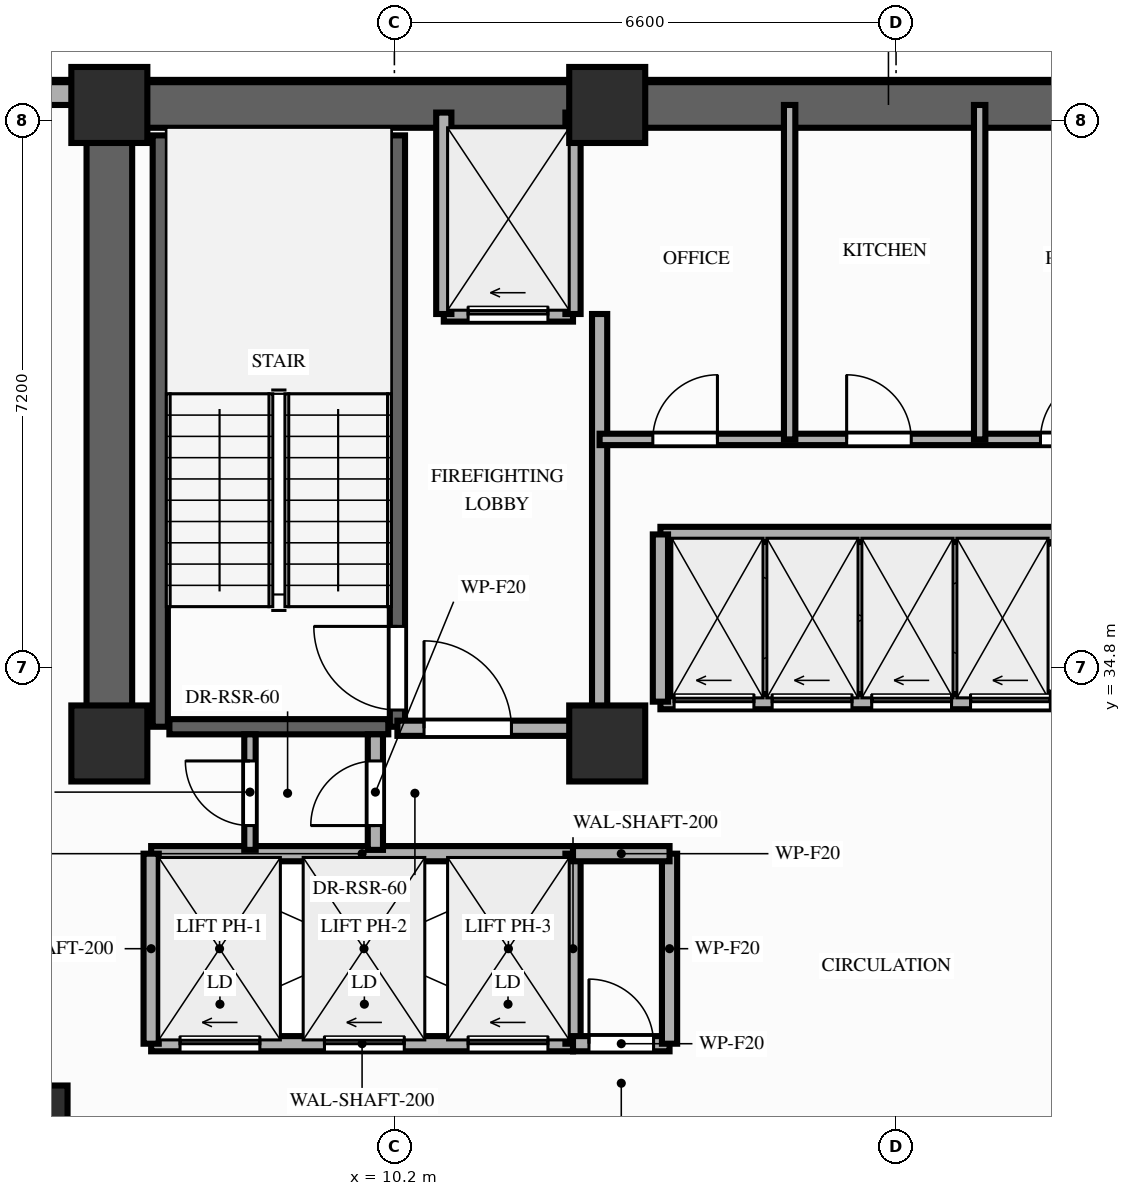
"""IFC4 building model, lengths in metres.
Left out: names, types, materials, properties, quantities, classifications, styles, units other than length and angle.
Written with IfcOpenShell. Run it as: python <this file> out.ifc"""

import sys

from ifc_helpers import new_model, si_unit, direction, frame, frame_2d, origin, origin_2d, place, context, subcontext, project, spatial, rectangle, extrude, element, fill, save


model = new_model("IFC4")
c1 = context("Model", 3, precision=1e-05, world=origin(), true_north=direction((0.0, 1.0)))
c2 = subcontext(c1, "Body", "Model", "MODEL_VIEW")
j1 = project(units=[si_unit("LENGTHUNIT", "METRE"), si_unit("PLANEANGLEUNIT", "RADIAN")], contexts=[c1])
p1 = place(None, origin())
s1 = spatial("IfcSite", under=j1, at=p1, CompositionType="ELEMENT")
p2 = place(p1, origin())
s2 = spatial("IfcBuilding", under=s1, at=p2, CompositionType="ELEMENT")
p3 = place(p2, frame((0.0, 0.0, 152.2)))
s3 = spatial("IfcBuildingStorey", under=s2, at=p3, CompositionType="ELEMENT", Elevation=152.2)
for number, where, z_axis, x_axis in (
    (1, (6.45, 33.8, 0.0), (0.0, 0.0, 1.0), (1.0, 0.0, 0.0)),
    (2, (13.0, 33.8, 0.0), (0.0, 0.0, 1.0), (1.0, 0.0, 0.0)),
    (3, (6.45, 42.2, 0.0), (0.0, 0.0, 1.0), (1.0, 0.0, 0.0)),
    (4, (13.0, 42.2, 0.0), (0.0, 0.0, 1.0), (1.0, 0.0, 0.0)),
    (5, (5.4, 28.8, 0.0), (0.0, 0.0, 1.0), (1.0, 0.0, 0.0)),
):
    element("IfcColumn", number, at=place(p3, frame(where, z_axis=z_axis, x_axis=x_axis)), inside=s3, PredefinedType="COLUMN", context=c2, shape_type="SweptSolid", body=[
        extrude(rectangle(XDim=1.0, YDim=1.0, at=origin_2d()), origin(), (0.0, 0.0, 1.0), 3.8),
    ])
p4 = place(p3, frame((6.0, 42.35, 0.0), z_axis=(0.0, 0.0, 1.0), x_axis=(-1.0, 0.0, 0.0)))
e6 = element("IfcWall", 6, at=p4, inside=s3, PredefinedType="STANDARD", context=c2, shape_type="SweptSolid", body=[
    extrude(rectangle(XDim=2.0, YDim=0.3, at=frame_2d((1.0, 0.0))), origin(), (0.0, 0.0, 1.0), 3.56),
])
p5 = place(p3, frame((6.45, 42.2, 0.0), z_axis=(0.0, 0.0, 1.0), x_axis=(1.0, 0.0, 0.0)))
e7 = element("IfcWall", 7, at=p5, inside=s3, PredefinedType="SHEAR", context=c2, shape_type="SweptSolid", body=[
    extrude(rectangle(XDim=20.45, YDim=0.6, at=frame_2d((10.225, 0.0))), origin(), (0.0, 0.0, 1.0), 3.56),
])
p6 = place(p3, frame((6.45, 33.8, 0.0), z_axis=(0.0, 0.0, 1.0), x_axis=(0.0, 1.0, 0.0)))
e8 = element("IfcWall", 8, at=p6, inside=s3, PredefinedType="SHEAR", context=c2, shape_type="SweptSolid", body=[
    extrude(rectangle(XDim=7.95, YDim=0.6, at=frame_2d((3.975, 0.0))), origin(), (0.0, 0.0, 1.0), 3.56),
])
p7 = place(p3, frame((7.12, 34.02, 0.0), z_axis=(0.0, 0.0, 1.0), x_axis=(0.0, 1.0, 0.0)))
e9 = element("IfcWall", 9, at=p7, inside=s3, PredefinedType="SHEAR", context=c2, shape_type="SweptSolid", body=[
    extrude(rectangle(XDim=7.78, YDim=0.2, at=frame_2d((3.89, 0.0))), origin(), (0.0, 0.0, 1.0), 3.56),
])
p8 = place(p3, frame((10.24, 34.02, 0.0), z_axis=(0.0, 0.0, 1.0), x_axis=(0.0, 1.0, 0.0)))
e10 = element("IfcWall", 10, at=p8, inside=s3, PredefinedType="SHEAR", context=c2, shape_type="SweptSolid", body=[
    extrude(rectangle(XDim=7.78, YDim=0.2, at=frame_2d((3.89, 0.0))), origin(), (0.0, 0.0, 1.0), 3.56),
])
p9 = place(p8, frame((0.22, 0.0, 0.0)))
e11 = element("IfcOpeningElement", 11, at=p9, cuts=e10, PredefinedType="OPENING", context=c2, shape_type="SweptSolid", body=[
    extrude(rectangle(XDim=1.1, YDim=2.15, at=frame_2d((0.55, 1.075))), frame((0.0, 0.11, 0.0), z_axis=(0.0, -1.0, 0.0), x_axis=(1.0, 0.0, 0.0)), (0.0, 0.0, 1.0), 0.22),
])
p10 = place(p3, frame((7.24, 34.02, 0.0), z_axis=(0.0, 0.0, 1.0), x_axis=(1.0, 0.0, 0.0)))
e12 = element("IfcWall", 12, at=p10, inside=s3, PredefinedType="SHEAR", context=c2, shape_type="SweptSolid", body=[
    extrude(rectangle(XDim=2.88, YDim=0.2, at=frame_2d((1.44, 0.0))), origin(), (0.0, 0.0, 1.0), 3.56),
])
p11 = place(p3, frame((7.0, 29.85, 0.0), z_axis=(0.0, 0.0, 1.0), x_axis=(1.0, 0.0, 0.0)))
e13 = element("IfcWall", 13, at=p11, inside=s3, PredefinedType="MOVABLE", context=c2, shape_type="SweptSolid", body=[
    extrude(rectangle(XDim=5.55, YDim=0.2, at=frame_2d((2.775, 0.0))), origin(), (0.0, 0.0, 1.0), 3.56),
])
p12 = place(p11, frame((0.38, 0.0, 0.0)))
e14 = element("IfcOpeningElement", 14, at=p12, cuts=e13, PredefinedType="OPENING", context=c2, shape_type="SweptSolid", body=[
    extrude(rectangle(XDim=1.05, YDim=2.15, at=frame_2d((0.525, 1.075))), frame((0.0, 0.11, 0.0), z_axis=(0.0, -1.0, 0.0), x_axis=(1.0, 0.0, 0.0)), (0.0, 0.0, 1.0), 0.22),
])
p13 = place(p11, frame((2.28, 0.0, 0.0)))
e15 = element("IfcOpeningElement", 15, at=p13, cuts=e13, PredefinedType="OPENING", context=c2, shape_type="SweptSolid", body=[
    extrude(rectangle(XDim=1.05, YDim=2.15, at=frame_2d((0.525, 1.075))), frame((0.0, 0.11, 0.0), z_axis=(0.0, -1.0, 0.0), x_axis=(1.0, 0.0, 0.0)), (0.0, 0.0, 1.0), 0.22),
])
p14 = place(p11, frame((4.17, 0.0, 0.0)))
e16 = element("IfcOpeningElement", 16, at=p14, cuts=e13, PredefinedType="OPENING", context=c2, shape_type="SweptSolid", body=[
    extrude(rectangle(XDim=1.05, YDim=2.15, at=frame_2d((0.525, 1.075))), frame((0.0, 0.11, 0.0), z_axis=(0.0, -1.0, 0.0), x_axis=(1.0, 0.0, 0.0)), (0.0, 0.0, 1.0), 0.22),
])
p15 = place(p3, frame((7.0, 32.35, 0.0), z_axis=(0.0, 0.0, 1.0), x_axis=(1.0, 0.0, 0.0)))
e17 = element("IfcWall", 17, at=p15, inside=s3, PredefinedType="MOVABLE", context=c2, shape_type="SweptSolid", body=[
    extrude(rectangle(XDim=5.55, YDim=0.2, at=frame_2d((2.775, 0.0))), origin(), (0.0, 0.0, 1.0), 3.56),
])
for number, where, z_axis, x_axis in (
    (18, (7.0, 29.85, 0.0), (0.0, 0.0, 1.0), (0.0, 1.0, 0.0)),
    (19, (12.55, 29.85, 0.0), (0.0, 0.0, 1.0), (0.0, 1.0, 0.0)),
):
    element("IfcWall", number, at=place(p3, frame(where, z_axis=z_axis, x_axis=x_axis)), inside=s3, PredefinedType="MOVABLE", context=c2, shape_type="SweptSolid", body=[
        extrude(rectangle(XDim=2.5, YDim=0.2, at=frame_2d((1.25, 0.0))), origin(), (0.0, 0.0, 1.0), 3.56),
    ])
p16 = place(p3, frame((10.85, 39.45, 0.0), z_axis=(0.0, 0.0, 1.0), x_axis=(1.0, 0.0, 0.0)))
e20 = element("IfcWall", 20, at=p16, inside=s3, PredefinedType="MOVABLE", context=c2, shape_type="SweptSolid", body=[
    extrude(rectangle(XDim=1.7, YDim=0.2, at=frame_2d((0.85, 0.0))), origin(), (0.0, 0.0, 1.0), 3.56),
])
p17 = place(p16, frame((0.32, 0.0, 0.0)))
e21 = element("IfcOpeningElement", 21, at=p17, cuts=e20, PredefinedType="OPENING", context=c2, shape_type="SweptSolid", body=[
    extrude(rectangle(XDim=1.05, YDim=2.15, at=frame_2d((0.525, 1.075))), frame((0.0, 0.11, 0.0), z_axis=(0.0, -1.0, 0.0), x_axis=(1.0, 0.0, 0.0)), (0.0, 0.0, 1.0), 0.22),
])
for number, where, z_axis, x_axis in (
    (22, (10.85, 39.45, 0.0), (0.0, 0.0, 1.0), (0.0, 1.0, 0.0)),
    (23, (12.55, 39.45, 0.0), (0.0, 0.0, 1.0), (0.0, 1.0, 0.0)),
):
    element("IfcWall", number, at=place(p3, frame(where, z_axis=z_axis, x_axis=x_axis)), inside=s3, PredefinedType="MOVABLE", context=c2, shape_type="SweptSolid", body=[
        extrude(rectangle(XDim=2.65, YDim=0.2, at=frame_2d((1.325, 0.0))), origin(), (0.0, 0.0, 1.0), 2.99),
    ])
p18 = place(p3, frame((12.9, 34.0, 0.0), z_axis=(0.0, 0.0, 1.0), x_axis=(0.0, 1.0, 0.0)))
e24 = element("IfcWall", 24, at=p18, inside=s3, PredefinedType="PARTITIONING", context=c2, shape_type="SweptSolid", body=[
    extrude(rectangle(XDim=5.45, YDim=0.2, at=frame_2d((2.725, 0.0))), origin(), (0.0, 0.0, 1.0), 2.99),
])
p19 = place(p3, frame((10.24, 34.0, 0.0), z_axis=(0.0, 0.0, 1.0), x_axis=(1.0, 0.0, 0.0)))
e25 = element("IfcWall", 25, at=p19, inside=s3, PredefinedType="PARTITIONING", context=c2, shape_type="SweptSolid", body=[
    extrude(rectangle(XDim=2.66, YDim=0.2, at=frame_2d((1.33, 0.0))), origin(), (0.0, 0.0, 1.0), 2.99),
])
p20 = place(p19, frame((0.35, 0.0, 0.0)))
e26 = element("IfcOpeningElement", 26, at=p20, cuts=e25, PredefinedType="OPENING", context=c2, shape_type="SweptSolid", body=[
    extrude(rectangle(XDim=1.15, YDim=2.15, at=frame_2d((0.575, 1.075))), frame((0.0, 0.11, 0.0), z_axis=(0.0, -1.0, 0.0), x_axis=(1.0, 0.0, 0.0)), (0.0, 0.0, 1.0), 0.22),
])
p21 = place(p3, frame((9.95, 32.4, 0.0), z_axis=(0.0, 0.0, 1.0), x_axis=(0.0, 1.0, 0.0)))
e27 = element("IfcWall", 27, at=p21, inside=s3, PredefinedType="PARTITIONING", context=c2, shape_type="SweptSolid", body=[
    extrude(rectangle(XDim=1.52, YDim=0.2, at=frame_2d((0.76, 0.0))), origin(), (0.0, 0.0, 1.0), 2.99),
])
p22 = place(p21, frame((0.32, 0.0, 0.0)))
e28 = element("IfcOpeningElement", 28, at=p22, cuts=e27, PredefinedType="OPENING", context=c2, shape_type="SweptSolid", body=[
    extrude(rectangle(XDim=0.85, YDim=2.05, at=frame_2d((0.425, 1.025))), frame((0.0, 0.11, 0.0), z_axis=(0.0, -1.0, 0.0), x_axis=(1.0, 0.0, 0.0)), (0.0, 0.0, 1.0), 0.22),
])
p23 = place(p3, frame((8.3, 32.4, 0.0), z_axis=(0.0, 0.0, 1.0), x_axis=(0.0, 1.0, 0.0)))
e29 = element("IfcWall", 29, at=p23, inside=s3, PredefinedType="PARTITIONING", context=c2, shape_type="SweptSolid", body=[
    extrude(rectangle(XDim=1.52, YDim=0.15, at=frame_2d((0.76, 0.0))), origin(), (0.0, 0.0, 1.0), 2.99),
])
p24 = place(p23, frame((0.32, 0.0, 0.0)))
e30 = element("IfcOpeningElement", 30, at=p24, cuts=e29, PredefinedType="OPENING", context=c2, shape_type="SweptSolid", body=[
    extrude(rectangle(XDim=0.85, YDim=2.05, at=frame_2d((0.425, 1.025))), frame((0.0, 0.085, 0.0), z_axis=(0.0, -1.0, 0.0), x_axis=(1.0, 0.0, 0.0)), (0.0, 0.0, 1.0), 0.17),
])
p25 = place(p3, frame((12.55, 29.85, 0.0), z_axis=(0.0, 0.0, 1.0), x_axis=(1.0, 0.0, 0.0)))
e31 = element("IfcWall", 31, at=p25, inside=s3, PredefinedType="PARTITIONING", context=c2, shape_type="SweptSolid", body=[
    extrude(rectangle(XDim=1.27, YDim=0.2, at=frame_2d((0.635, 0.0))), origin(), (0.0, 0.0, 1.0), 3.56),
])
p26 = place(p25, frame((0.21, 0.0, 0.0)))
e32 = element("IfcOpeningElement", 32, at=p26, cuts=e31, PredefinedType="OPENING", context=c2, shape_type="SweptSolid", body=[
    extrude(rectangle(XDim=0.85, YDim=2.05, at=frame_2d((0.425, 1.025))), frame((0.0, 0.11, 0.0), z_axis=(0.0, -1.0, 0.0), x_axis=(1.0, 0.0, 0.0)), (0.0, 0.0, 1.0), 0.22),
])
p27 = place(p3, frame((13.82, 29.85, 0.0), z_axis=(0.0, 0.0, 1.0), x_axis=(0.0, 1.0, 0.0)))
e33 = element("IfcWall", 33, at=p27, inside=s3, PredefinedType="PARTITIONING", context=c2, shape_type="SweptSolid", body=[
    extrude(rectangle(XDim=2.5, YDim=0.2, at=frame_2d((1.25, 0.0))), origin(), (0.0, 0.0, 1.0), 3.56),
])
p28 = place(p3, frame((12.55, 32.35, 0.0), z_axis=(0.0, 0.0, 1.0), x_axis=(1.0, 0.0, 0.0)))
e34 = element("IfcWall", 34, at=p28, inside=s3, PredefinedType="PARTITIONING", context=c2, shape_type="SweptSolid", body=[
    extrude(rectangle(XDim=1.27, YDim=0.2, at=frame_2d((0.635, 0.0))), origin(), (0.0, 0.0, 1.0), 3.56),
])
p29 = place(p3, frame((12.9, 37.8, 0.0), z_axis=(0.0, 0.0, 1.0), x_axis=(1.0, 0.0, 0.0)))
e35 = element("IfcWall", 35, at=p29, inside=s3, PredefinedType="PARTITIONING", context=c2, shape_type="SweptSolid", body=[
    extrude(rectangle(XDim=7.6, YDim=0.15, at=frame_2d((3.8, 0.0))), origin(), (0.0, 0.0, 1.0), 3.56),
])
p30 = place(p29, frame((0.7, 0.0, 0.0)))
e36 = element("IfcOpeningElement", 36, at=p30, cuts=e35, PredefinedType="OPENING", context=c2, shape_type="SweptSolid", body=[
    extrude(rectangle(XDim=0.85, YDim=2.05, at=frame_2d((0.425, 1.025))), frame((0.0, 0.085, 0.0), z_axis=(0.0, -1.0, 0.0), x_axis=(1.0, 0.0, 0.0)), (0.0, 0.0, 1.0), 0.17),
])
p31 = place(p29, frame((3.25, 0.0, 0.0)))
e37 = element("IfcOpeningElement", 37, at=p31, cuts=e35, PredefinedType="OPENING", context=c2, shape_type="SweptSolid", body=[
    extrude(rectangle(XDim=0.85, YDim=2.05, at=frame_2d((0.425, 1.025))), frame((0.0, 0.085, 0.0), z_axis=(0.0, -1.0, 0.0), x_axis=(1.0, 0.0, 0.0)), (0.0, 0.0, 1.0), 0.17),
])
p32 = place(p29, frame((5.8, 0.0, 0.0)))
e38 = element("IfcOpeningElement", 38, at=p32, cuts=e35, PredefinedType="OPENING", context=c2, shape_type="SweptSolid", body=[
    extrude(rectangle(XDim=0.85, YDim=2.05, at=frame_2d((0.425, 1.025))), frame((0.0, 0.085, 0.0), z_axis=(0.0, -1.0, 0.0), x_axis=(1.0, 0.0, 0.0)), (0.0, 0.0, 1.0), 0.17),
])
for number, where, z_axis, x_axis in (
    (39, (15.4, 37.8, 0.0), (0.0, 0.0, 1.0), (0.0, 1.0, 0.0)),
    (40, (17.9, 37.8, 0.0), (0.0, 0.0, 1.0), (0.0, 1.0, 0.0)),
):
    element("IfcWall", number, at=place(p3, frame(where, z_axis=z_axis, x_axis=x_axis)), inside=s3, PredefinedType="PARTITIONING", context=c2, shape_type="SweptSolid", body=[
        extrude(rectangle(XDim=4.4, YDim=0.15, at=frame_2d((2.2, 0.0))), origin(), (0.0, 0.0, 1.0), 2.99),
    ])
p33 = place(p3, frame((13.7, 34.35, 0.0), z_axis=(0.0, 0.0, 1.0), x_axis=(1.0, 0.0, 0.0)))
e41 = element("IfcWall", 41, at=p33, inside=s3, PredefinedType="MOVABLE", context=c2, shape_type="SweptSolid", body=[
    extrude(rectangle(XDim=5.42, YDim=0.2, at=frame_2d((2.71, 0.0))), origin(), (0.0, 0.0, 1.0), 3.56),
])
p34 = place(p33, frame((0.18, 0.0, 0.0)))
e42 = element("IfcOpeningElement", 42, at=p34, cuts=e41, PredefinedType="OPENING", context=c2, shape_type="SweptSolid", body=[
    extrude(rectangle(XDim=1.05, YDim=2.15, at=frame_2d((0.525, 1.075))), frame((0.0, 0.11, 0.0), z_axis=(0.0, -1.0, 0.0), x_axis=(1.0, 0.0, 0.0)), (0.0, 0.0, 1.0), 0.22),
])
p35 = place(p33, frame((1.47, 0.0, 0.0)))
e43 = element("IfcOpeningElement", 43, at=p35, cuts=e41, PredefinedType="OPENING", context=c2, shape_type="SweptSolid", body=[
    extrude(rectangle(XDim=1.05, YDim=2.15, at=frame_2d((0.525, 1.075))), frame((0.0, 0.11, 0.0), z_axis=(0.0, -1.0, 0.0), x_axis=(1.0, 0.0, 0.0)), (0.0, 0.0, 1.0), 0.22),
])
p36 = place(p33, frame((2.78, 0.0, 0.0)))
e44 = element("IfcOpeningElement", 44, at=p36, cuts=e41, PredefinedType="OPENING", context=c2, shape_type="SweptSolid", body=[
    extrude(rectangle(XDim=1.05, YDim=2.15, at=frame_2d((0.525, 1.075))), frame((0.0, 0.11, 0.0), z_axis=(0.0, -1.0, 0.0), x_axis=(1.0, 0.0, 0.0)), (0.0, 0.0, 1.0), 0.22),
])
p37 = place(p33, frame((4.08, 0.0, 0.0)))
e45 = element("IfcOpeningElement", 45, at=p37, cuts=e41, PredefinedType="OPENING", context=c2, shape_type="SweptSolid", body=[
    extrude(rectangle(XDim=1.05, YDim=2.15, at=frame_2d((0.525, 1.075))), frame((0.0, 0.11, 0.0), z_axis=(0.0, -1.0, 0.0), x_axis=(1.0, 0.0, 0.0)), (0.0, 0.0, 1.0), 0.22),
])
p38 = place(p3, frame((13.7, 36.55, 0.0), z_axis=(0.0, 0.0, 1.0), x_axis=(1.0, 0.0, 0.0)))
e46 = element("IfcWall", 46, at=p38, inside=s3, PredefinedType="MOVABLE", context=c2, shape_type="SweptSolid", body=[
    extrude(rectangle(XDim=5.42, YDim=0.2, at=frame_2d((2.71, 0.0))), origin(), (0.0, 0.0, 1.0), 3.56),
])
p39 = place(p3, frame((13.7, 34.35, 0.0), z_axis=(0.0, 0.0, 1.0), x_axis=(0.0, 1.0, 0.0)))
e47 = element("IfcWall", 47, at=p39, inside=s3, PredefinedType="MOVABLE", context=c2, shape_type="SweptSolid", body=[
    extrude(rectangle(XDim=2.2, YDim=0.2, at=frame_2d((1.1, 0.0))), origin(), (0.0, 0.0, 1.0), 3.56),
])
p40 = place(p9, origin())
e48 = element("IfcDoor", 48, at=p40, inside=s3, OperationType="SINGLE_SWING_RIGHT", PredefinedType="DOOR", context=c2, shape_type="SweptSolid", body=[
    extrude(rectangle(XDim=1.1, YDim=2.15, at=frame_2d((0.55, 1.075))), frame((0.0, 0.025, 0.0), z_axis=(0.0, -1.0, 0.0), x_axis=(1.0, 0.0, 0.0)), (0.0, 0.0, 1.0), 0.05),
])
fill(e11, e48)
p41 = place(p12, origin())
e49 = element("IfcDoor", 49, at=p41, inside=s3, OperationType="SLIDING_TO_LEFT", PredefinedType="DOOR", context=c2, shape_type="SweptSolid", body=[
    extrude(rectangle(XDim=1.05, YDim=2.15, at=frame_2d((0.525, 1.075))), frame((0.0, 0.025, 0.0), z_axis=(0.0, -1.0, 0.0), x_axis=(1.0, 0.0, 0.0)), (0.0, 0.0, 1.0), 0.05),
])
fill(e14, e49)
p42 = place(p13, origin())
e50 = element("IfcDoor", 50, at=p42, inside=s3, OperationType="SLIDING_TO_LEFT", PredefinedType="DOOR", context=c2, shape_type="SweptSolid", body=[
    extrude(rectangle(XDim=1.05, YDim=2.15, at=frame_2d((0.525, 1.075))), frame((0.0, 0.025, 0.0), z_axis=(0.0, -1.0, 0.0), x_axis=(1.0, 0.0, 0.0)), (0.0, 0.0, 1.0), 0.05),
])
fill(e15, e50)
p43 = place(p14, origin())
e51 = element("IfcDoor", 51, at=p43, inside=s3, OperationType="SLIDING_TO_LEFT", PredefinedType="DOOR", context=c2, shape_type="SweptSolid", body=[
    extrude(rectangle(XDim=1.05, YDim=2.15, at=frame_2d((0.525, 1.075))), frame((0.0, 0.025, 0.0), z_axis=(0.0, -1.0, 0.0), x_axis=(1.0, 0.0, 0.0)), (0.0, 0.0, 1.0), 0.05),
])
fill(e16, e51)
p44 = place(p17, origin())
e52 = element("IfcDoor", 52, at=p44, inside=s3, OperationType="SLIDING_TO_LEFT", PredefinedType="DOOR", context=c2, shape_type="SweptSolid", body=[
    extrude(rectangle(XDim=1.05, YDim=2.15, at=frame_2d((0.525, 1.075))), frame((0.0, 0.025, 0.0), z_axis=(0.0, -1.0, 0.0), x_axis=(1.0, 0.0, 0.0)), (0.0, 0.0, 1.0), 0.05),
])
fill(e21, e52)
p45 = place(p20, origin())
e53 = element("IfcDoor", 53, at=p45, inside=s3, OperationType="SINGLE_SWING_LEFT", PredefinedType="DOOR", context=c2, shape_type="SweptSolid", body=[
    extrude(rectangle(XDim=1.15, YDim=2.15, at=frame_2d((0.575, 1.075))), frame((0.0, 0.025, 0.0), z_axis=(0.0, -1.0, 0.0), x_axis=(1.0, 0.0, 0.0)), (0.0, 0.0, 1.0), 0.05),
])
fill(e26, e53)
p46 = place(p22, origin())
e54 = element("IfcDoor", 54, at=p46, inside=s3, OperationType="SINGLE_SWING_LEFT", PredefinedType="DOOR", context=c2, shape_type="SweptSolid", body=[
    extrude(rectangle(XDim=0.85, YDim=2.05, at=frame_2d((0.425, 1.025))), frame((0.0, 0.025, 0.0), z_axis=(0.0, -1.0, 0.0), x_axis=(1.0, 0.0, 0.0)), (0.0, 0.0, 1.0), 0.05),
])
fill(e28, e54)
p47 = place(p24, origin())
e55 = element("IfcDoor", 55, at=p47, inside=s3, OperationType="SINGLE_SWING_RIGHT", PredefinedType="DOOR", context=c2, shape_type="SweptSolid", body=[
    extrude(rectangle(XDim=0.85, YDim=2.05, at=frame_2d((0.425, 1.025))), frame((0.0, 0.025, 0.0), z_axis=(0.0, -1.0, 0.0), x_axis=(1.0, 0.0, 0.0)), (0.0, 0.0, 1.0), 0.05),
])
fill(e30, e55)
p48 = place(p26, origin())
e56 = element("IfcDoor", 56, at=p48, inside=s3, OperationType="SINGLE_SWING_LEFT", PredefinedType="DOOR", context=c2, shape_type="SweptSolid", body=[
    extrude(rectangle(XDim=0.85, YDim=2.05, at=frame_2d((0.425, 1.025))), frame((0.0, 0.025, 0.0), z_axis=(0.0, -1.0, 0.0), x_axis=(1.0, 0.0, 0.0)), (0.0, 0.0, 1.0), 0.05),
])
fill(e32, e56)
p49 = place(p30, origin())
e57 = element("IfcDoor", 57, at=p49, inside=s3, OperationType="SINGLE_SWING_RIGHT", PredefinedType="DOOR", context=c2, shape_type="SweptSolid", body=[
    extrude(rectangle(XDim=0.85, YDim=2.05, at=frame_2d((0.425, 1.025))), frame((0.0, 0.025, 0.0), z_axis=(0.0, -1.0, 0.0), x_axis=(1.0, 0.0, 0.0)), (0.0, 0.0, 1.0), 0.05),
])
fill(e36, e57)
p50 = place(p31, origin())
e58 = element("IfcDoor", 58, at=p50, inside=s3, OperationType="SINGLE_SWING_LEFT", PredefinedType="DOOR", context=c2, shape_type="SweptSolid", body=[
    extrude(rectangle(XDim=0.85, YDim=2.05, at=frame_2d((0.425, 1.025))), frame((0.0, 0.025, 0.0), z_axis=(0.0, -1.0, 0.0), x_axis=(1.0, 0.0, 0.0)), (0.0, 0.0, 1.0), 0.05),
])
fill(e37, e58)
p51 = place(p32, origin())
e59 = element("IfcDoor", 59, at=p51, inside=s3, OperationType="SINGLE_SWING_RIGHT", PredefinedType="DOOR", context=c2, shape_type="SweptSolid", body=[
    extrude(rectangle(XDim=0.85, YDim=2.05, at=frame_2d((0.425, 1.025))), frame((0.0, 0.025, 0.0), z_axis=(0.0, -1.0, 0.0), x_axis=(1.0, 0.0, 0.0)), (0.0, 0.0, 1.0), 0.05),
])
fill(e38, e59)
p52 = place(p34, origin())
e60 = element("IfcDoor", 60, at=p52, inside=s3, OperationType="SLIDING_TO_LEFT", PredefinedType="DOOR", context=c2, shape_type="SweptSolid", body=[
    extrude(rectangle(XDim=1.05, YDim=2.15, at=frame_2d((0.525, 1.075))), frame((0.0, 0.025, 0.0), z_axis=(0.0, -1.0, 0.0), x_axis=(1.0, 0.0, 0.0)), (0.0, 0.0, 1.0), 0.05),
])
fill(e42, e60)
p53 = place(p35, origin())
e61 = element("IfcDoor", 61, at=p53, inside=s3, OperationType="SLIDING_TO_LEFT", PredefinedType="DOOR", context=c2, shape_type="SweptSolid", body=[
    extrude(rectangle(XDim=1.05, YDim=2.15, at=frame_2d((0.525, 1.075))), frame((0.0, 0.025, 0.0), z_axis=(0.0, -1.0, 0.0), x_axis=(1.0, 0.0, 0.0)), (0.0, 0.0, 1.0), 0.05),
])
fill(e43, e61)
p54 = place(p36, origin())
e62 = element("IfcDoor", 62, at=p54, inside=s3, OperationType="SLIDING_TO_LEFT", PredefinedType="DOOR", context=c2, shape_type="SweptSolid", body=[
    extrude(rectangle(XDim=1.05, YDim=2.15, at=frame_2d((0.525, 1.075))), frame((0.0, 0.025, 0.0), z_axis=(0.0, -1.0, 0.0), x_axis=(1.0, 0.0, 0.0)), (0.0, 0.0, 1.0), 0.05),
])
fill(e44, e62)
p55 = place(p37, origin())
e63 = element("IfcDoor", 63, at=p55, inside=s3, OperationType="SLIDING_TO_LEFT", PredefinedType="DOOR", context=c2, shape_type="SweptSolid", body=[
    extrude(rectangle(XDim=1.05, YDim=2.15, at=frame_2d((0.525, 1.075))), frame((0.0, 0.025, 0.0), z_axis=(0.0, -1.0, 0.0), x_axis=(1.0, 0.0, 0.0)), (0.0, 0.0, 1.0), 0.05),
])
fill(e45, e63)
save(model, sys.argv[1])
